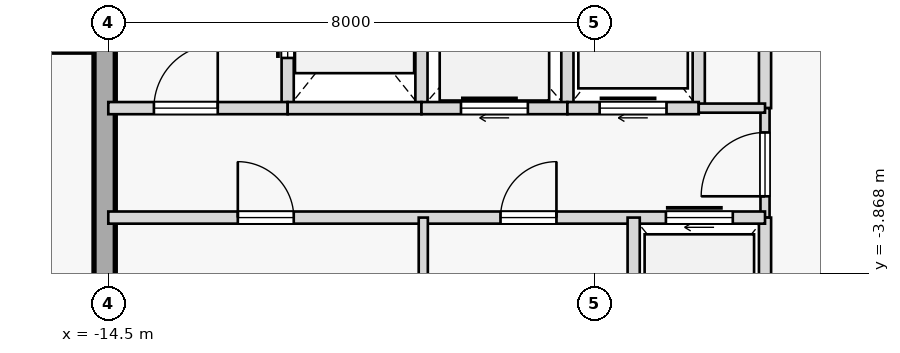
"""IFC4 building model, lengths in metres.
Left out: names, types, materials, properties, quantities, classifications, styles, units other than length and angle.
Written with IfcOpenShell. Run it as: python <this file> out.ifc"""

import sys

from ifc_helpers import new_model, si_unit, direction, frame, frame_2d, origin, place, context, subcontext, project, spatial, rectangle, extrude, element, fill, save


model = new_model("IFC4")
c1 = context("Model", 3, precision=1e-05, world=origin(), true_north=direction((0.0, 1.0)))
c2 = subcontext(c1, "Body", "Model", "MODEL_VIEW")
j1 = project(units=[si_unit("LENGTHUNIT", "METRE"), si_unit("PLANEANGLEUNIT", "RADIAN")], contexts=[c1])
p1 = place(None, origin())
s1 = spatial("IfcSite", under=j1, at=p1, CompositionType="ELEMENT")
p2 = place(p1, origin())
s2 = spatial("IfcBuilding", under=s1, at=p2, CompositionType="ELEMENT")
p3 = place(p2, frame((0.0, 0.0, 227.65)))
s3 = spatial("IfcBuildingStorey", under=s2, at=p3, CompositionType="ELEMENT", Elevation=227.65)
p4 = place(p3, frame((-14.56, -5.425, 0.0), z_axis=(0.0, 0.0, 1.0), x_axis=(0.0, 1.0, 0.0)))
e1 = element("IfcWall", 1, at=p4, inside=s3, PredefinedType="SHEAR", context=c2, shape_type="SweptSolid", body=[
    extrude(rectangle(XDim=10.85, YDim=0.35, at=frame_2d((5.425, 0.0))), origin(), (0.0, 0.0, 1.0), 3.125),
])
p5 = place(p3, frame((-3.7, -1.15, 0.0), z_axis=(0.0, 0.0, 1.0), x_axis=(0.0, 1.0, 0.0)))
e2 = element("IfcWall", 2, at=p5, inside=s3, PredefinedType="STANDARD", context=c2, shape_type="SweptSolid", body=[
    extrude(rectangle(XDim=6.75, YDim=0.2, at=frame_2d((3.375, 0.0))), origin(), (0.0, 0.0, 1.0), 3.125),
])
p6 = place(p5, frame((3.6, 0.0, 0.0)))
e3 = element("IfcOpeningElement", 3, at=p6, cuts=e2, PredefinedType="OPENING", context=c2, shape_type="SweptSolid", body=[
    extrude(rectangle(XDim=0.92, YDim=2.15, at=frame_2d((0.46, 1.075))), frame((0.0, 0.11, 0.0), z_axis=(0.0, -1.0, 0.0), x_axis=(1.0, 0.0, 0.0)), (0.0, 0.0, 1.0), 0.22),
])
p7 = place(p3, frame((-3.7, -2.95, 0.0), z_axis=(0.0, 0.0, 1.0), x_axis=(0.0, 1.0, 0.0)))
e4 = element("IfcWall", 4, at=p7, inside=s3, PredefinedType="PARTITIONING", context=c2, shape_type="SweptSolid", body=[
    extrude(rectangle(XDim=1.8, YDim=0.15, at=frame_2d((0.9, 0.0))), origin(), (0.0, 0.0, 1.0), 3.125),
])
p8 = place(p7, frame((0.35, 0.0, 0.0)))
e5 = element("IfcOpeningElement", 5, at=p8, cuts=e4, PredefinedType="OPENING", context=c2, shape_type="SweptSolid", body=[
    extrude(rectangle(XDim=1.05, YDim=2.18, at=frame_2d((0.525, 1.09))), frame((0.0, 0.085, 0.0), z_axis=(0.0, -1.0, 0.0), x_axis=(1.0, 0.0, 0.0)), (0.0, 0.0, 1.0), 0.17),
])
p9 = place(p3, frame((-3.7, -5.6, 0.0), z_axis=(0.0, 0.0, 1.0), x_axis=(0.0, 1.0, 0.0)))
e6 = element("IfcWall", 6, at=p9, inside=s3, PredefinedType="STANDARD", context=c2, shape_type="SweptSolid", body=[
    extrude(rectangle(XDim=2.65, YDim=0.2, at=frame_2d((1.325, 0.0))), origin(), (0.0, 0.0, 1.0), 3.125),
])
p10 = place(p3, frame((-11.55, -1.15, 0.0), z_axis=(0.0, 0.0, 1.0), x_axis=(0.0, 1.0, 0.0)))
e7 = element("IfcWall", 7, at=p10, inside=s3, PredefinedType="STANDARD", context=c2, shape_type="SweptSolid", body=[
    extrude(rectangle(XDim=2.75, YDim=0.2, at=frame_2d((1.375, 0.0))), origin(), (0.0, 0.0, 1.0), 3.125),
])
p11 = place(p10, frame((0.825, 0.0, 0.0)))
e8 = element("IfcOpeningElement", 8, at=p11, cuts=e7, PredefinedType="OPENING", context=c2, shape_type="SweptSolid", body=[
    extrude(rectangle(XDim=1.1, YDim=2.15, at=frame_2d((0.55, 1.075))), frame((0.0, 0.11, 0.0), z_axis=(0.0, -1.0, 0.0), x_axis=(1.0, 0.0, 0.0)), (0.0, 0.0, 1.0), 0.22),
])
p12 = place(p3, frame((-9.35, -1.15, 0.0), z_axis=(0.0, 0.0, 1.0), x_axis=(0.0, 1.0, 0.0)))
e9 = element("IfcWall", 9, at=p12, inside=s3, PredefinedType="STANDARD", context=c2, shape_type="SweptSolid", body=[
    extrude(rectangle(XDim=2.75, YDim=0.2, at=frame_2d((1.375, 0.0))), origin(), (0.0, 0.0, 1.0), 3.125),
])
p13 = place(p3, frame((-14.5, -1.15, 0.0), z_axis=(0.0, 0.0, 1.0), x_axis=(1.0, 0.0, 0.0)))
e10 = element("IfcWall", 10, at=p13, inside=s3, PredefinedType="STANDARD", context=c2, shape_type="SweptSolid", body=[
    extrude(rectangle(XDim=2.95, YDim=0.2, at=frame_2d((1.475, 0.0))), origin(), (0.0, 0.0, 1.0), 3.125),
])
p14 = place(p13, frame((0.75, 0.0, 0.0)))
e11 = element("IfcOpeningElement", 11, at=p14, cuts=e10, PredefinedType="OPENING", context=c2, shape_type="SweptSolid", body=[
    extrude(rectangle(XDim=1.05, YDim=2.18, at=frame_2d((0.525, 1.09))), frame((0.0, 0.11, 0.0), z_axis=(0.0, -1.0, 0.0), x_axis=(1.0, 0.0, 0.0)), (0.0, 0.0, 1.0), 0.22),
])
p15 = place(p3, frame((-11.55, -1.15, 0.0), z_axis=(0.0, 0.0, 1.0), x_axis=(1.0, 0.0, 0.0)))
e12 = element("IfcWall", 12, at=p15, inside=s3, PredefinedType="STANDARD", context=c2, shape_type="SweptSolid", body=[
    extrude(rectangle(XDim=2.2, YDim=0.2, at=frame_2d((1.1, 0.0))), origin(), (0.0, 0.0, 1.0), 3.125),
])
p16 = place(p3, frame((-6.95, -1.15, 0.0), z_axis=(0.0, 0.0, 1.0), x_axis=(0.0, 1.0, 0.0)))
e13 = element("IfcWall", 13, at=p16, inside=s3, PredefinedType="STANDARD", context=c2, shape_type="SweptSolid", body=[
    extrude(rectangle(XDim=2.75, YDim=0.2, at=frame_2d((1.375, 0.0))), origin(), (0.0, 0.0, 1.0), 3.125),
])
p17 = place(p3, frame((-9.35, -1.15, 0.0), z_axis=(0.0, 0.0, 1.0), x_axis=(1.0, 0.0, 0.0)))
e14 = element("IfcWall", 14, at=p17, inside=s3, PredefinedType="STANDARD", context=c2, shape_type="SweptSolid", body=[
    extrude(rectangle(XDim=2.4, YDim=0.2, at=frame_2d((1.2, 0.0))), origin(), (0.0, 0.0, 1.0), 3.125),
])
p18 = place(p17, frame((0.65, 0.0, 0.0)))
e15 = element("IfcOpeningElement", 15, at=p18, cuts=e14, PredefinedType="OPENING", context=c2, shape_type="SweptSolid", body=[
    extrude(rectangle(XDim=1.1, YDim=2.15, at=frame_2d((0.55, 1.075))), frame((0.0, 0.11, 0.0), z_axis=(0.0, -1.0, 0.0), x_axis=(1.0, 0.0, 0.0)), (0.0, 0.0, 1.0), 0.22),
])
p19 = place(p3, frame((-4.79, -1.15, 0.0), z_axis=(0.0, 0.0, 1.0), x_axis=(0.0, 1.0, 0.0)))
e16 = element("IfcWall", 16, at=p19, inside=s3, PredefinedType="STANDARD", context=c2, shape_type="SweptSolid", body=[
    extrude(rectangle(XDim=2.75, YDim=0.2, at=frame_2d((1.375, 0.0))), origin(), (0.0, 0.0, 1.0), 3.125),
])
p20 = place(p3, frame((-6.95, -1.15, 0.0), z_axis=(0.0, 0.0, 1.0), x_axis=(1.0, 0.0, 0.0)))
e17 = element("IfcWall", 17, at=p20, inside=s3, PredefinedType="STANDARD", context=c2, shape_type="SweptSolid", body=[
    extrude(rectangle(XDim=2.16, YDim=0.2, at=frame_2d((1.08, 0.0))), origin(), (0.0, 0.0, 1.0), 3.125),
])
p21 = place(p20, frame((0.53, 0.0, 0.0)))
e18 = element("IfcOpeningElement", 18, at=p21, cuts=e17, PredefinedType="OPENING", context=c2, shape_type="SweptSolid", body=[
    extrude(rectangle(XDim=1.1, YDim=2.15, at=frame_2d((0.55, 1.075))), frame((0.0, 0.11, 0.0), z_axis=(0.0, -1.0, 0.0), x_axis=(1.0, 0.0, 0.0)), (0.0, 0.0, 1.0), 0.22),
])
p22 = place(p3, frame((-4.79, -1.15, 0.0), z_axis=(0.0, 0.0, 1.0), x_axis=(1.0, 0.0, 0.0)))
e19 = element("IfcWall", 19, at=p22, inside=s3, PredefinedType="PARTITIONING", context=c2, shape_type="SweptSolid", body=[
    extrude(rectangle(XDim=1.09, YDim=0.15, at=frame_2d((0.545, 0.0))), origin(), (0.0, 0.0, 1.0), 3.125),
])
p23 = place(p3, frame((-14.5, -2.95, 0.0), z_axis=(0.0, 0.0, 1.0), x_axis=(1.0, 0.0, 0.0)))
e20 = element("IfcWall", 20, at=p23, inside=s3, PredefinedType="STANDARD", context=c2, shape_type="SweptSolid", body=[
    extrude(rectangle(XDim=10.8, YDim=0.2, at=frame_2d((5.4, 0.0))), origin(), (0.0, 0.0, 1.0), 3.125),
])
p24 = place(p23, frame((9.17, 0.0, 0.0)))
e21 = element("IfcOpeningElement", 21, at=p24, cuts=e20, PredefinedType="OPENING", context=c2, shape_type="SweptSolid", body=[
    extrude(rectangle(XDim=1.1, YDim=2.15, at=frame_2d((0.55, 1.075))), frame((0.0, 0.11, 0.0), z_axis=(0.0, -1.0, 0.0), x_axis=(1.0, 0.0, 0.0)), (0.0, 0.0, 1.0), 0.22),
])
p25 = place(p23, frame((2.13, 0.0, 0.0)))
e22 = element("IfcOpeningElement", 22, at=p25, cuts=e20, PredefinedType="OPENING", context=c2, shape_type="SweptSolid", body=[
    extrude(rectangle(XDim=0.92, YDim=2.15, at=frame_2d((0.46, 1.075))), frame((0.0, 0.11, 0.0), z_axis=(0.0, -1.0, 0.0), x_axis=(1.0, 0.0, 0.0)), (0.0, 0.0, 1.0), 0.22),
])
p26 = place(p23, frame((6.45, 0.0, 0.0)))
e23 = element("IfcOpeningElement", 23, at=p26, cuts=e20, PredefinedType="OPENING", context=c2, shape_type="SweptSolid", body=[
    extrude(rectangle(XDim=0.92, YDim=2.15, at=frame_2d((0.46, 1.075))), frame((0.0, 0.11, 0.0), z_axis=(0.0, -1.0, 0.0), x_axis=(1.0, 0.0, 0.0)), (0.0, 0.0, 1.0), 0.22),
])
p27 = place(p3, frame((-5.86, -5.6, 0.0), z_axis=(0.0, 0.0, 1.0), x_axis=(0.0, 1.0, 0.0)))
e24 = element("IfcWall", 24, at=p27, inside=s3, PredefinedType="STANDARD", context=c2, shape_type="SweptSolid", body=[
    extrude(rectangle(XDim=2.65, YDim=0.2, at=frame_2d((1.325, 0.0))), origin(), (0.0, 0.0, 1.0), 3.125),
])
p28 = place(p3, frame((-9.32, -5.6, 0.0), z_axis=(0.0, 0.0, 1.0), x_axis=(0.0, 1.0, 0.0)))
e25 = element("IfcWall", 25, at=p28, inside=s3, PredefinedType="PARTITIONING", context=c2, shape_type="SweptSolid", body=[
    extrude(rectangle(XDim=2.65, YDim=0.15, at=frame_2d((1.325, 0.0))), origin(), (0.0, 0.0, 1.0), 3.125),
])
p29 = place(p14, origin())
e26 = element("IfcDoor", 26, at=p29, inside=s3, OperationType="SINGLE_SWING_RIGHT", PredefinedType="DOOR", context=c2, shape_type="SweptSolid", body=[
    extrude(rectangle(XDim=1.05, YDim=2.18, at=frame_2d((0.525, 1.09))), frame((0.0, 0.025, 0.0), z_axis=(0.0, -1.0, 0.0), x_axis=(1.0, 0.0, 0.0)), (0.0, 0.0, 1.0), 0.05),
])
fill(e11, e26)
p30 = place(p8, origin())
e27 = element("IfcDoor", 27, at=p30, inside=s3, OperationType="SINGLE_SWING_LEFT", PredefinedType="DOOR", context=c2, shape_type="SweptSolid", body=[
    extrude(rectangle(XDim=1.05, YDim=2.18, at=frame_2d((0.525, 1.09))), frame((0.0, 0.025, 0.0), z_axis=(0.0, -1.0, 0.0), x_axis=(1.0, 0.0, 0.0)), (0.0, 0.0, 1.0), 0.05),
])
fill(e5, e27)
p31 = place(p11, origin())
e28 = element("IfcDoor", 28, at=p31, inside=s3, OperationType="SLIDING_TO_RIGHT", PredefinedType="DOOR", context=c2, shape_type="SweptSolid", body=[
    extrude(rectangle(XDim=1.1, YDim=2.15, at=frame_2d((0.55, 1.075))), frame((0.0, 0.025, 0.0), z_axis=(0.0, -1.0, 0.0), x_axis=(1.0, 0.0, 0.0)), (0.0, 0.0, 1.0), 0.05),
])
fill(e8, e28)
p32 = place(p18, origin())
e29 = element("IfcDoor", 29, at=p32, inside=s3, OperationType="SLIDING_TO_RIGHT", PredefinedType="DOOR", context=c2, shape_type="SweptSolid", body=[
    extrude(rectangle(XDim=1.1, YDim=2.15, at=frame_2d((0.55, 1.075))), frame((0.0, 0.025, 0.0), z_axis=(0.0, -1.0, 0.0), x_axis=(1.0, 0.0, 0.0)), (0.0, 0.0, 1.0), 0.05),
])
fill(e15, e29)
p33 = place(p21, origin())
e30 = element("IfcDoor", 30, at=p33, inside=s3, OperationType="SLIDING_TO_RIGHT", PredefinedType="DOOR", context=c2, shape_type="SweptSolid", body=[
    extrude(rectangle(XDim=1.1, YDim=2.15, at=frame_2d((0.55, 1.075))), frame((0.0, 0.025, 0.0), z_axis=(0.0, -1.0, 0.0), x_axis=(1.0, 0.0, 0.0)), (0.0, 0.0, 1.0), 0.05),
])
fill(e18, e30)
p34 = place(p24, origin())
e31 = element("IfcDoor", 31, at=p34, inside=s3, OperationType="SLIDING_TO_RIGHT", PredefinedType="DOOR", context=c2, shape_type="SweptSolid", body=[
    extrude(rectangle(XDim=1.1, YDim=2.15, at=frame_2d((0.55, 1.075))), frame((0.0, 0.025, 0.0), z_axis=(0.0, -1.0, 0.0), x_axis=(1.0, 0.0, 0.0)), (0.0, 0.0, 1.0), 0.05),
])
fill(e21, e31)
p35 = place(p25, origin())
e32 = element("IfcDoor", 32, at=p35, inside=s3, OperationType="SINGLE_SWING_LEFT", PredefinedType="DOOR", context=c2, shape_type="SweptSolid", body=[
    extrude(rectangle(XDim=0.92, YDim=2.15, at=frame_2d((0.46, 1.075))), frame((0.0, 0.025, 0.0), z_axis=(0.0, -1.0, 0.0), x_axis=(1.0, 0.0, 0.0)), (0.0, 0.0, 1.0), 0.05),
])
fill(e22, e32)
p36 = place(p26, origin())
e33 = element("IfcDoor", 33, at=p36, inside=s3, OperationType="SINGLE_SWING_RIGHT", PredefinedType="DOOR", context=c2, shape_type="SweptSolid", body=[
    extrude(rectangle(XDim=0.92, YDim=2.15, at=frame_2d((0.46, 1.075))), frame((0.0, 0.025, 0.0), z_axis=(0.0, -1.0, 0.0), x_axis=(1.0, 0.0, 0.0)), (0.0, 0.0, 1.0), 0.05),
])
fill(e23, e33)
save(model, sys.argv[1])
